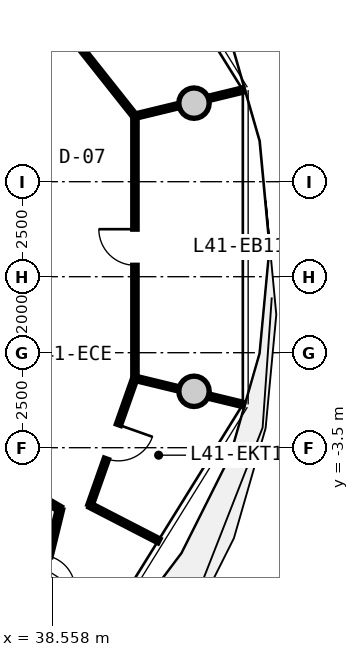
"""IFC4 building model, lengths in metres.
Left out: names, types, materials, properties, quantities, classifications, styles, units other than length and angle.
Written with IfcOpenShell. Run it as: python <this file> out.ifc"""

import sys

from ifc_helpers import new_model, si_unit, direction, frame, frame_2d, origin, origin_2d, place, context, subcontext, project, spatial, rectangle, circle, extrude, source, transform, mapped, element, fill, save


model = new_model("IFC4")
c1 = context("Model", 3, precision=1e-05, world=origin(), true_north=direction((0.0, 1.0)))
c2 = subcontext(c1, "Body", "Model", "MODEL_VIEW")
j1 = project(units=[si_unit("LENGTHUNIT", "METRE"), si_unit("PLANEANGLEUNIT", "RADIAN")], contexts=[c1])
p1 = place(None, origin())
s1 = spatial("IfcSite", under=j1, at=p1, CompositionType="ELEMENT")
p2 = place(p1, origin())
s2 = spatial("IfcBuilding", under=s1, at=p2, CompositionType="ELEMENT")
p3 = place(p2, frame((0.0, 0.0, 134.3)))
s3 = spatial("IfcBuildingStorey", under=s2, at=p3, CompositionType="ELEMENT", Elevation=134.3)
m1 = source(origin(), c2, "Body", "SweptSolid", [
    extrude(circle(Radius=0.4, at=origin_2d()), origin(), (0.0, 0.0, 1.0), 3.47),
])
for number, where, z_axis, x_axis in (
    (1, (42.285, 5.567, -0.42), (0.0, 0.0, 1.0), (1.0, 0.0, 0.0)),
    (2, (42.285, -2.016, -0.42), (0.0, 0.0, 1.0), (1.0, 0.0, 0.0)),
):
    element("IfcColumn", number, at=place(p3, frame(where, z_axis=z_axis, x_axis=x_axis)), inside=s3, PredefinedType="COLUMN", context=c2, shape_type="MappedRepresentation", body=[
        mapped(m1, transform((0.0, 0.0, 0.0), x_axis=(1.0, 0.0, 0.0), y_axis=(0.0, 1.0, 0.0), z_axis=(0.0, 0.0, 1.0), scale=1.0)),
    ])
m2 = source(origin(), c2, "Body", "SweptSolid", [
    extrude(rectangle(XDim=6.897, YDim=0.115, at=frame_2d((3.448, 0.0))), origin(), (0.0, 0.0, 1.0), 2.795),
])
p4 = place(p3, frame((40.73, -1.673, 0.0), z_axis=(0.0, 0.0, 1.0), x_axis=(0.0, 1.0, 0.0)))
e3 = element("IfcWall", 3, at=p4, inside=s3, PredefinedType="PARTITIONING", context=c2, shape_type="MappedRepresentation", body=[
    mapped(m2, transform((0.0, 0.0, 0.0), x_axis=(1.0, 0.0, 0.0), y_axis=(0.0, 1.0, 0.0), z_axis=(0.0, 0.0, 1.0), scale=1.0)),
])
p5 = place(p4, frame((2.973, 0.0, 0.0)))
e4 = element("IfcOpeningElement", 4, at=p5, cuts=e3, PredefinedType="OPENING", context=c2, shape_type="SweptSolid", body=[
    extrude(rectangle(XDim=0.95, YDim=2.1, at=frame_2d((0.475, 1.05))), frame((0.0, 0.067, 0.0), z_axis=(0.0, -1.0, 0.0), x_axis=(1.0, 0.0, 0.0)), (0.0, 0.0, 1.0), 0.135),
])
m3 = source(origin(), c2, "Body", "SweptSolid", [
    extrude(rectangle(XDim=2.941, YDim=0.115, at=frame_2d((1.471, 0.0))), origin(), (0.0, 0.0, 1.0), 2.345),
])
p6 = place(p3, frame((40.73, -1.673, 0.0), z_axis=(0.0, 0.0, 1.0), x_axis=(0.971874866371, -0.235497864357, 0.0)))
e5 = element("IfcWall", 5, at=p6, inside=s3, PredefinedType="PARTITIONING", context=c2, shape_type="MappedRepresentation", body=[
    mapped(m3, transform((0.0, 0.0, 0.0), x_axis=(1.0, 0.0, 0.0), y_axis=(0.0, 1.0, 0.0), z_axis=(0.0, 0.0, 1.0), scale=1.0)),
])
m4 = source(origin(), c2, "Body", "SweptSolid", [
    extrude(rectangle(XDim=6.902, YDim=0.115, at=frame_2d((3.451, 0.0))), origin(), (0.0, 0.0, 1.0), 2.795),
])
p7 = place(p3, frame((40.729, 5.223, 0.0), z_axis=(0.0, 0.0, 1.0), x_axis=(-0.62123371778, 0.783625336429, 0.0)))
e6 = element("IfcWall", 6, at=p7, inside=s3, PredefinedType="PARTITIONING", context=c2, shape_type="MappedRepresentation", body=[
    mapped(m4, transform((0.0, 0.0, 0.0), x_axis=(1.0, 0.0, 0.0), y_axis=(0.0, 1.0, 0.0), z_axis=(0.0, 0.0, 1.0), scale=1.0)),
])
p8 = place(p7, frame((2.976, 0.0, 0.0)))
e7 = element("IfcOpeningElement", 7, at=p8, cuts=e6, PredefinedType="OPENING", context=c2, shape_type="SweptSolid", body=[
    extrude(rectangle(XDim=0.95, YDim=2.1, at=frame_2d((0.475, 1.05))), frame((0.0, 0.067, 0.0), z_axis=(0.0, -1.0, 0.0), x_axis=(1.0, 0.0, 0.0)), (0.0, 0.0, 1.0), 0.135),
])
m5 = source(origin(), c2, "Body", "SweptSolid", [
    extrude(rectangle(XDim=2.943, YDim=0.115, at=frame_2d((1.471, 0.0))), origin(), (0.0, 0.0, 1.0), 2.345),
])
p9 = place(p3, frame((40.729, 5.223, 0.0), z_axis=(0.0, 0.0, 1.0), x_axis=(0.971864495214, 0.235540660911, 0.0)))
e8 = element("IfcWall", 8, at=p9, inside=s3, PredefinedType="PARTITIONING", context=c2, shape_type="MappedRepresentation", body=[
    mapped(m5, transform((0.0, 0.0, 0.0), x_axis=(1.0, 0.0, 0.0), y_axis=(0.0, 1.0, 0.0), z_axis=(0.0, 0.0, 1.0), scale=1.0)),
])
m6 = source(origin(), c2, "Body", "SweptSolid", [
    extrude(rectangle(XDim=1.425, YDim=0.14, at=frame_2d((0.712, 0.0))), origin(), (0.0, 0.0, 1.0), 2.795),
])
p10 = place(p3, frame((37.53, -4.396, 0.0), z_axis=(0.0, 0.0, 1.0), x_axis=(0.86324395577, -0.50478695786, 0.0)))
e9 = element("IfcWall", 9, at=p10, inside=s3, PredefinedType="PARTITIONING", context=c2, shape_type="MappedRepresentation", body=[
    mapped(m6, transform((0.0, 0.0, 0.0), x_axis=(1.0, 0.0, 0.0), y_axis=(0.0, 1.0, 0.0), z_axis=(0.0, 0.0, 1.0), scale=1.0)),
])
m7 = source(origin(), c2, "Body", "SweptSolid", [
    extrude(rectangle(XDim=3.464, YDim=0.14, at=frame_2d((1.732, 0.0))), origin(), (0.0, 0.0, 1.0), 2.795),
])
p11 = place(p3, frame((38.76, -5.115, 0.0), z_axis=(0.0, 0.0, 1.0), x_axis=(-0.238055968485, -0.971251438027, 0.0)))
e10 = element("IfcWall", 10, at=p11, inside=s3, PredefinedType="PARTITIONING", context=c2, shape_type="MappedRepresentation", body=[
    mapped(m7, transform((0.0, 0.0, 0.0), x_axis=(1.0, 0.0, 0.0), y_axis=(0.0, 1.0, 0.0), z_axis=(0.0, 0.0, 1.0), scale=1.0)),
])
p12 = place(p11, frame((1.272, 0.0, 0.0)))
e11 = element("IfcOpeningElement", 11, at=p12, cuts=e10, PredefinedType="OPENING", context=c2, shape_type="SweptSolid", body=[
    extrude(rectangle(XDim=0.92, YDim=2.1, at=frame_2d((0.46, 1.05))), frame((0.0, 0.08, 0.0), z_axis=(0.0, -1.0, 0.0), x_axis=(1.0, 0.0, 0.0)), (0.0, 0.0, 1.0), 0.16),
])
m8 = source(origin(), c2, "Body", "SweptSolid", [
    extrude(rectangle(XDim=2.043, YDim=0.115, at=frame_2d((1.022, 0.0))), origin(), (0.0, 0.0, 1.0), 2.795),
])
p13 = place(p3, frame((39.547, -5.016, 0.0), z_axis=(0.0, 0.0, 1.0), x_axis=(0.888790240023, -0.45831420362, 0.0)))
e12 = element("IfcWall", 12, at=p13, inside=s3, PredefinedType="PARTITIONING", context=c2, shape_type="MappedRepresentation", body=[
    mapped(m8, transform((0.0, 0.0, 0.0), x_axis=(1.0, 0.0, 0.0), y_axis=(0.0, 1.0, 0.0), z_axis=(0.0, 0.0, 1.0), scale=1.0)),
])
m9 = source(origin(), c2, "Body", "SweptSolid", [
    extrude(rectangle(XDim=3.546, YDim=0.115, at=frame_2d((1.773, 0.0))), origin(), (0.0, 0.0, 1.0), 2.795),
])
p14 = place(p3, frame((39.547, -5.016, 0.0), z_axis=(0.0, 0.0, 1.0), x_axis=(0.333403534043, 0.942784218943, 0.0)))
e13 = element("IfcWall", 13, at=p14, inside=s3, PredefinedType="PARTITIONING", context=c2, shape_type="MappedRepresentation", body=[
    mapped(m9, transform((0.0, 0.0, 0.0), x_axis=(1.0, 0.0, 0.0), y_axis=(0.0, 1.0, 0.0), z_axis=(0.0, 0.0, 1.0), scale=1.0)),
])
p15 = place(p14, frame((1.298, 0.0, 0.0)))
e14 = element("IfcOpeningElement", 14, at=p15, cuts=e13, PredefinedType="OPENING", context=c2, shape_type="SweptSolid", body=[
    extrude(rectangle(XDim=0.95, YDim=2.1, at=frame_2d((0.475, 1.05))), frame((0.0, 0.067, 0.0), z_axis=(0.0, -1.0, 0.0), x_axis=(1.0, 0.0, 0.0)), (0.0, 0.0, 1.0), 0.135),
])
m10 = source(origin(), c2, "Body", "SweptSolid", [
    extrude(rectangle(XDim=0.95, YDim=2.1, at=frame_2d((0.475, 1.05))), frame((0.0, 0.025, 0.0), z_axis=(0.0, -1.0, 0.0), x_axis=(1.0, 0.0, 0.0)), (0.0, 0.0, 1.0), 0.05),
])
p16 = place(p15, frame((0.95, 0.0, 0.0), z_axis=(0.0, 0.0, 1.0), x_axis=(-1.0, 0.0, 0.0)))
e15 = element("IfcDoor", 15, at=p16, inside=s3, OperationType="SINGLE_SWING_LEFT", PredefinedType="DOOR", context=c2, shape_type="MappedRepresentation", body=[
    mapped(m10, transform((0.0, 0.0, 0.0), x_axis=(1.0, 0.0, 0.0), y_axis=(0.0, 1.0, 0.0), z_axis=(0.0, 0.0, 1.0), scale=1.0)),
])
fill(e14, e15)
p17 = place(p5, origin())
e16 = element("IfcDoor", 16, at=p17, inside=s3, OperationType="SINGLE_SWING_RIGHT", PredefinedType="DOOR", context=c2, shape_type="MappedRepresentation", body=[
    mapped(m10, transform((0.0, 0.0, 0.0), x_axis=(1.0, 0.0, 0.0), y_axis=(0.0, 1.0, 0.0), z_axis=(0.0, 0.0, 1.0), scale=1.0)),
])
fill(e4, e16)
save(model, sys.argv[1])
